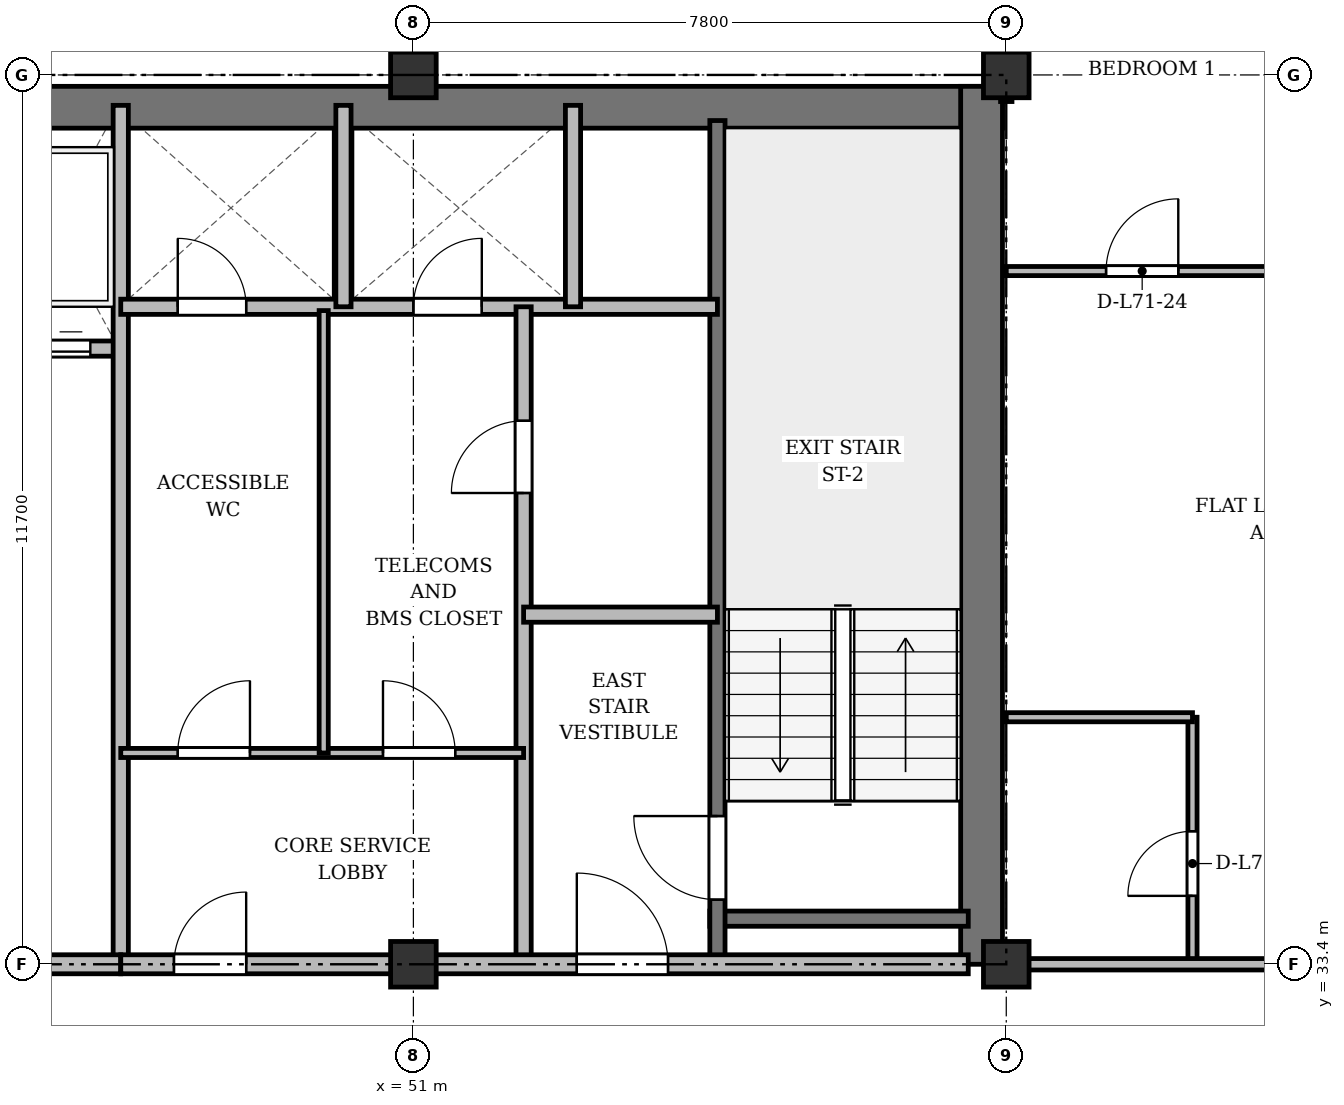
"""IFC4 building model, lengths in metres.
Left out: names, types, materials, properties, quantities, classifications, styles, units other than length and angle.
Written with IfcOpenShell. Run it as: python <this file> out.ifc"""

import sys

from ifc_helpers import new_model, si_unit, direction, frame, frame_2d, origin, origin_2d, place, context, subcontext, project, spatial, rectangle, extrude, source, transform, mapped, element, fill, save


model = new_model("IFC4")
c1 = context("Model", 3, precision=1e-05, world=origin(), true_north=direction((0.0, 1.0)))
c2 = subcontext(c1, "Body", "Model", "MODEL_VIEW")
j1 = project(units=[si_unit("LENGTHUNIT", "METRE"), si_unit("PLANEANGLEUNIT", "RADIAN")], contexts=[c1])
p1 = place(None, origin())
s1 = spatial("IfcSite", under=j1, at=p1, CompositionType="ELEMENT")
p2 = place(p1, origin())
s2 = spatial("IfcBuilding", under=s1, at=p2, CompositionType="ELEMENT")
p3 = place(p2, frame((0.0, 0.0, 273.9)))
s3 = spatial("IfcBuildingStorey", under=s2, at=p3, CompositionType="ELEMENT", Elevation=273.9)
m1 = source(origin(), c2, "Body", "SweptSolid", [
    extrude(rectangle(XDim=0.6, YDim=0.6, at=origin_2d()), origin(), (0.0, 0.0, 1.0), 3.6),
])
for number, where, z_axis, x_axis in (
    (1, (51.0, 33.4, 0.0), (0.0, 0.0, 1.0), (1.0, 0.0, 0.0)),
    (2, (51.0, 45.1, 0.0), (0.0, 0.0, 1.0), (1.0, 0.0, 0.0)),
    (3, (58.8, 33.4, 0.0), (0.0, 0.0, 1.0), (1.0, 0.0, 0.0)),
    (4, (58.8, 45.1, 0.0), (0.0, 0.0, 1.0), (1.0, 0.0, 0.0)),
):
    element("IfcColumn", number, at=place(p3, frame(where, z_axis=z_axis, x_axis=x_axis)), inside=s3, PredefinedType="COLUMN", context=c2, shape_type="MappedRepresentation", body=[
        mapped(m1, transform((0.0, 0.0, 0.0), x_axis=(1.0, 0.0, 0.0), y_axis=(0.0, 1.0, 0.0), z_axis=(0.0, 0.0, 1.0), scale=1.0)),
    ])
p4 = place(p3, frame((15.65, 44.675, 0.0), z_axis=(0.0, 0.0, 1.0), x_axis=(1.0, 0.0, 0.0)))
e5 = element("IfcWall", 5, at=p4, inside=s3, PredefinedType="SHEAR", context=c2, shape_type="SweptSolid", body=[
    extrude(rectangle(XDim=43.1, YDim=0.55, at=frame_2d((21.55, 0.0))), origin(), (0.0, 0.0, 1.0), 3.37),
])
p5 = place(p3, frame((58.475, 33.4, 0.0), z_axis=(0.0, 0.0, 1.0), x_axis=(0.0, 1.0, 0.0)))
e6 = element("IfcWall", 6, at=p5, inside=s3, PredefinedType="SHEAR", context=c2, shape_type="SweptSolid", body=[
    extrude(rectangle(XDim=11.55, YDim=0.55, at=frame_2d((5.775, 0.0))), origin(), (0.0, 0.0, 1.0), 3.37),
])
p6 = place(p3, frame((54.9, 34.0, 0.0), z_axis=(0.0, 0.0, 1.0), x_axis=(1.0, 0.0, 0.0)))
e7 = element("IfcWall", 7, at=p6, inside=s3, PredefinedType="SHEAR", context=c2, shape_type="SweptSolid", body=[
    extrude(rectangle(XDim=3.4, YDim=0.2, at=frame_2d((1.7, 0.0))), origin(), (0.0, 0.0, 1.0), 3.37),
])
p7 = place(p3, frame((55.0, 33.4, 0.0), z_axis=(0.0, 0.0, 1.0), x_axis=(0.0, 1.0, 0.0)))
e8 = element("IfcWall", 8, at=p7, inside=s3, PredefinedType="SHEAR", context=c2, shape_type="SweptSolid", body=[
    extrude(rectangle(XDim=11.1, YDim=0.2, at=frame_2d((5.55, 0.0))), origin(), (0.0, 0.0, 1.0), 3.37),
])
p8 = place(p7, frame((0.85, 0.0, 0.0)))
e9 = element("IfcOpeningElement", 9, at=p8, cuts=e8, PredefinedType="OPENING", context=c2, shape_type="SweptSolid", body=[
    extrude(rectangle(XDim=1.1, YDim=2.15, at=frame_2d((0.55, 1.075))), frame((0.0, 0.11, 0.0), z_axis=(0.0, -1.0, 0.0), x_axis=(1.0, 0.0, 0.0)), (0.0, 0.0, 1.0), 0.22),
])
p9 = place(p3, frame((40.25, 41.5, 0.0), z_axis=(0.0, 0.0, 1.0), x_axis=(1.0, 0.0, 0.0)))
e10 = element("IfcWall", 10, at=p9, inside=s3, PredefinedType="SOLIDWALL", context=c2, shape_type="SweptSolid", body=[
    extrude(rectangle(XDim=6.9, YDim=0.2, at=frame_2d((3.45, 0.0))), origin(), (0.0, 0.0, 1.0), 3.37),
])
p10 = place(p9, frame((0.35, 0.0, 0.0)))
e11 = element("IfcOpeningElement", 11, at=p10, cuts=e10, PredefinedType="OPENING", context=c2, shape_type="SweptSolid", body=[
    extrude(rectangle(XDim=1.05, YDim=2.15, at=frame_2d((0.525, 1.075))), frame((0.0, 0.11, 0.0), z_axis=(0.0, -1.0, 0.0), x_axis=(1.0, 0.0, 0.0)), (0.0, 0.0, 1.0), 0.22),
])
p11 = place(p9, frame((2.05, 0.0, 0.0)))
e12 = element("IfcOpeningElement", 12, at=p11, cuts=e10, PredefinedType="OPENING", context=c2, shape_type="SweptSolid", body=[
    extrude(rectangle(XDim=1.05, YDim=2.15, at=frame_2d((0.525, 1.075))), frame((0.0, 0.11, 0.0), z_axis=(0.0, -1.0, 0.0), x_axis=(1.0, 0.0, 0.0)), (0.0, 0.0, 1.0), 0.22),
])
p12 = place(p9, frame((3.75, 0.0, 0.0)))
e13 = element("IfcOpeningElement", 13, at=p12, cuts=e10, PredefinedType="OPENING", context=c2, shape_type="SweptSolid", body=[
    extrude(rectangle(XDim=1.05, YDim=2.15, at=frame_2d((0.525, 1.075))), frame((0.0, 0.11, 0.0), z_axis=(0.0, -1.0, 0.0), x_axis=(1.0, 0.0, 0.0)), (0.0, 0.0, 1.0), 0.22),
])
p13 = place(p9, frame((5.45, 0.0, 0.0)))
e14 = element("IfcOpeningElement", 14, at=p13, cuts=e10, PredefinedType="OPENING", context=c2, shape_type="SweptSolid", body=[
    extrude(rectangle(XDim=1.05, YDim=2.15, at=frame_2d((0.525, 1.075))), frame((0.0, 0.11, 0.0), z_axis=(0.0, -1.0, 0.0), x_axis=(1.0, 0.0, 0.0)), (0.0, 0.0, 1.0), 0.22),
])
p14 = place(p3, frame((47.15, 33.4, 0.0), z_axis=(0.0, 0.0, 1.0), x_axis=(0.0, 1.0, 0.0)))
e15 = element("IfcWall", 15, at=p14, inside=s3, PredefinedType="SOLIDWALL", context=c2, shape_type="SweptSolid", body=[
    extrude(rectangle(XDim=11.3, YDim=0.2, at=frame_2d((5.65, 0.0))), origin(), (0.0, 0.0, 1.0), 2.92),
])
p15 = place(p3, frame((40.1, 33.4, 0.0), z_axis=(0.0, 0.0, 1.0), x_axis=(1.0, 0.0, 0.0)))
e16 = element("IfcWall", 16, at=p15, inside=s3, PredefinedType="PARTITIONING", context=c2, shape_type="SweptSolid", body=[
    extrude(rectangle(XDim=7.05, YDim=0.25, at=frame_2d((3.525, 0.0))), origin(), (0.0, 0.0, 1.0), 2.92),
])
p16 = place(p15, frame((0.65, 0.0, 0.0)))
e17 = element("IfcOpeningElement", 17, at=p16, cuts=e16, PredefinedType="OPENING", context=c2, shape_type="SweptSolid", body=[
    extrude(rectangle(XDim=1.6, YDim=2.2, at=frame_2d((0.8, 1.1))), frame((0.0, 0.135, 0.0), z_axis=(0.0, -1.0, 0.0), x_axis=(1.0, 0.0, 0.0)), (0.0, 0.0, 1.0), 0.27),
])
p17 = place(p3, frame((47.15, 42.05, 0.0), z_axis=(0.0, 0.0, 1.0), x_axis=(1.0, 0.0, 0.0)))
e18 = element("IfcWall", 18, at=p17, inside=s3, PredefinedType="SOLIDWALL", context=c2, shape_type="SweptSolid", body=[
    extrude(rectangle(XDim=7.85, YDim=0.2, at=frame_2d((3.925, 0.0))), origin(), (0.0, 0.0, 1.0), 2.87),
])
p18 = place(p17, frame((0.75, 0.0, 0.0)))
e19 = element("IfcOpeningElement", 19, at=p18, cuts=e18, PredefinedType="OPENING", context=c2, shape_type="SweptSolid", body=[
    extrude(rectangle(XDim=0.9, YDim=2.1, at=frame_2d((0.45, 1.05))), frame((0.0, 0.11, 0.0), z_axis=(0.0, -1.0, 0.0), x_axis=(1.0, 0.0, 0.0)), (0.0, 0.0, 1.0), 0.22),
])
p19 = place(p17, frame((3.85, 0.0, 0.0)))
e20 = element("IfcOpeningElement", 20, at=p19, cuts=e18, PredefinedType="OPENING", context=c2, shape_type="SweptSolid", body=[
    extrude(rectangle(XDim=0.9, YDim=2.1, at=frame_2d((0.45, 1.05))), frame((0.0, 0.11, 0.0), z_axis=(0.0, -1.0, 0.0), x_axis=(1.0, 0.0, 0.0)), (0.0, 0.0, 1.0), 0.22),
])
for number, where, z_axis, x_axis in (
    (21, (50.08, 42.05, 0.0), (0.0, 0.0, 1.0), (0.0, 1.0, 0.0)),
    (22, (53.1, 42.05, 0.0), (0.0, 0.0, 1.0), (0.0, 1.0, 0.0)),
):
    element("IfcWall", number, at=place(p3, frame(where, z_axis=z_axis, x_axis=x_axis)), inside=s3, PredefinedType="SOLIDWALL", context=c2, shape_type="SweptSolid", body=[
        extrude(rectangle(XDim=2.65, YDim=0.2, at=frame_2d((1.325, 0.0))), origin(), (0.0, 0.0, 1.0), 3.37),
    ])
p20 = place(p3, frame((52.45, 33.4, 0.0), z_axis=(0.0, 0.0, 1.0), x_axis=(0.0, 1.0, 0.0)))
e23 = element("IfcWall", 23, at=p20, inside=s3, PredefinedType="PARTITIONING", context=c2, shape_type="SweptSolid", body=[
    extrude(rectangle(XDim=8.65, YDim=0.2, at=frame_2d((4.325, 0.0))), origin(), (0.0, 0.0, 1.0), 2.92),
])
p21 = place(p20, frame((6.2, 0.0, 0.0)))
e24 = element("IfcOpeningElement", 24, at=p21, cuts=e23, PredefinedType="OPENING", context=c2, shape_type="SweptSolid", body=[
    extrude(rectangle(XDim=0.95, YDim=2.15, at=frame_2d((0.475, 1.075))), frame((0.0, 0.11, 0.0), z_axis=(0.0, -1.0, 0.0), x_axis=(1.0, 0.0, 0.0)), (0.0, 0.0, 1.0), 0.22),
])
p22 = place(p3, frame((52.45, 38.0, 0.0), z_axis=(0.0, 0.0, 1.0), x_axis=(1.0, 0.0, 0.0)))
e25 = element("IfcWall", 25, at=p22, inside=s3, PredefinedType="PARTITIONING", context=c2, shape_type="SweptSolid", body=[
    extrude(rectangle(XDim=2.55, YDim=0.2, at=frame_2d((1.275, 0.0))), origin(), (0.0, 0.0, 1.0), 3.37),
])
p23 = place(p3, frame((47.15, 36.18, 0.0), z_axis=(0.0, 0.0, 1.0), x_axis=(1.0, 0.0, 0.0)))
e26 = element("IfcWall", 26, at=p23, inside=s3, PredefinedType="PARTITIONING", context=c2, shape_type="SweptSolid", body=[
    extrude(rectangle(XDim=5.3, YDim=0.12, at=frame_2d((2.65, 0.0))), origin(), (0.0, 0.0, 1.0), 2.87),
])
p24 = place(p23, frame((0.75, 0.0, 0.0)))
e27 = element("IfcOpeningElement", 27, at=p24, cuts=e26, PredefinedType="OPENING", context=c2, shape_type="SweptSolid", body=[
    extrude(rectangle(XDim=0.95, YDim=2.15, at=frame_2d((0.475, 1.075))), frame((0.0, 0.07, 0.0), z_axis=(0.0, -1.0, 0.0), x_axis=(1.0, 0.0, 0.0)), (0.0, 0.0, 1.0), 0.14),
])
p25 = place(p23, frame((3.45, 0.0, 0.0)))
e28 = element("IfcOpeningElement", 28, at=p25, cuts=e26, PredefinedType="OPENING", context=c2, shape_type="SweptSolid", body=[
    extrude(rectangle(XDim=0.95, YDim=2.15, at=frame_2d((0.475, 1.075))), frame((0.0, 0.07, 0.0), z_axis=(0.0, -1.0, 0.0), x_axis=(1.0, 0.0, 0.0)), (0.0, 0.0, 1.0), 0.14),
])
p26 = place(p3, frame((49.82, 36.18, 0.0), z_axis=(0.0, 0.0, 1.0), x_axis=(0.0, 1.0, 0.0)))
e29 = element("IfcWall", 29, at=p26, inside=s3, PredefinedType="PARTITIONING", context=c2, shape_type="SweptSolid", body=[
    extrude(rectangle(XDim=5.82, YDim=0.12, at=frame_2d((2.91, 0.0))), origin(), (0.0, 0.0, 1.0), 3.37),
])
p27 = place(p3, frame((47.15, 33.4, 0.0), z_axis=(0.0, 0.0, 1.0), x_axis=(1.0, 0.0, 0.0)))
e30 = element("IfcWall", 30, at=p27, inside=s3, PredefinedType="PARTITIONING", context=c2, shape_type="SweptSolid", body=[
    extrude(rectangle(XDim=11.15, YDim=0.25, at=frame_2d((5.575, 0.0))), origin(), (0.0, 0.0, 1.0), 2.92),
])
p28 = place(p27, frame((0.7, 0.0, 0.0)))
e31 = element("IfcOpeningElement", 31, at=p28, cuts=e30, PredefinedType="OPENING", context=c2, shape_type="SweptSolid", body=[
    extrude(rectangle(XDim=0.95, YDim=2.15, at=frame_2d((0.475, 1.075))), frame((0.0, 0.135, 0.0), z_axis=(0.0, -1.0, 0.0), x_axis=(1.0, 0.0, 0.0)), (0.0, 0.0, 1.0), 0.27),
])
p29 = place(p27, frame((6.0, 0.0, 0.0)))
e32 = element("IfcOpeningElement", 32, at=p29, cuts=e30, PredefinedType="OPENING", context=c2, shape_type="SweptSolid", body=[
    extrude(rectangle(XDim=1.2, YDim=2.15, at=frame_2d((0.6, 1.075))), frame((0.0, 0.135, 0.0), z_axis=(0.0, -1.0, 0.0), x_axis=(1.0, 0.0, 0.0)), (0.0, 0.0, 1.0), 0.27),
])
p30 = place(p3, frame((61.25, 33.4, 0.0), z_axis=(0.0, 0.0, 1.0), x_axis=(0.0, 1.0, 0.0)))
e33 = element("IfcWall", 33, at=p30, inside=s3, PredefinedType="PARTITIONING", context=c2, shape_type="SweptSolid", body=[
    extrude(rectangle(XDim=3.25, YDim=0.12, at=frame_2d((1.625, 0.0))), origin(), (0.0, 0.0, 1.0), 2.92),
])
p31 = place(p30, frame((0.9, 0.0, 0.0)))
e34 = element("IfcOpeningElement", 34, at=p31, cuts=e33, PredefinedType="OPENING", context=c2, shape_type="SweptSolid", body=[
    extrude(rectangle(XDim=0.85, YDim=2.1, at=frame_2d((0.425, 1.05))), frame((0.0, 0.07, 0.0), z_axis=(0.0, -1.0, 0.0), x_axis=(1.0, 0.0, 0.0)), (0.0, 0.0, 1.0), 0.14),
])
p32 = place(p3, frame((58.8, 36.65, 0.0), z_axis=(0.0, 0.0, 1.0), x_axis=(1.0, 0.0, 0.0)))
e35 = element("IfcWall", 35, at=p32, inside=s3, PredefinedType="PARTITIONING", context=c2, shape_type="SweptSolid", body=[
    extrude(rectangle(XDim=2.45, YDim=0.12, at=frame_2d((1.225, 0.0))), origin(), (0.0, 0.0, 1.0), 2.87),
])
p33 = place(p3, frame((58.8, 42.52, 0.0), z_axis=(0.0, 0.0, 1.0), x_axis=(1.0, 0.0, 0.0)))
e36 = element("IfcWall", 36, at=p33, inside=s3, PredefinedType="PARTITIONING", context=c2, shape_type="SweptSolid", body=[
    extrude(rectangle(XDim=3.575, YDim=0.12, at=frame_2d((1.788, 0.0))), origin(), (0.0, 0.0, 1.0), 2.87),
])
p34 = place(p33, frame((1.313, 0.0, 0.0)))
e37 = element("IfcOpeningElement", 37, at=p34, cuts=e36, PredefinedType="OPENING", context=c2, shape_type="SweptSolid", body=[
    extrude(rectangle(XDim=0.95, YDim=2.15, at=frame_2d((0.475, 1.075))), frame((0.0, 0.07, 0.0), z_axis=(0.0, -1.0, 0.0), x_axis=(1.0, 0.0, 0.0)), (0.0, 0.0, 1.0), 0.14),
])
p35 = place(p3, frame((58.8, 33.4, 0.0), z_axis=(0.0, 0.0, 1.0), x_axis=(1.0, 0.0, 0.0)))
e38 = element("IfcWall", 38, at=p35, inside=s3, PredefinedType="PARTITIONING", context=c2, shape_type="SweptSolid", body=[
    extrude(rectangle(XDim=7.15, YDim=0.15, at=frame_2d((3.575, 0.0))), origin(), (0.0, 0.0, 1.0), 2.92),
])
p36 = place(p35, frame((4.08, 0.0, 0.0)))
e39 = element("IfcOpeningElement", 39, at=p36, cuts=e38, PredefinedType="OPENING", context=c2, shape_type="SweptSolid", body=[
    extrude(rectangle(XDim=0.95, YDim=2.15, at=frame_2d((0.475, 1.075))), frame((0.0, 0.085, 0.0), z_axis=(0.0, -1.0, 0.0), x_axis=(1.0, 0.0, 0.0)), (0.0, 0.0, 1.0), 0.17),
])
p37 = place(p3, frame((58.8, 44.75, 0.0), z_axis=(0.0, 0.0, 1.0), x_axis=(0.0, 1.0, 0.0)))
e40 = element("IfcWall", 40, at=p37, inside=s3, PredefinedType="PARTITIONING", context=c2, shape_type="SweptSolid", body=[
    extrude(rectangle(XDim=3.61, YDim=0.15, at=frame_2d((1.805, 0.0))), origin(), (0.0, 0.0, 1.0), 2.87),
])
p38 = place(p37, frame((1.1, 0.0, 0.0)))
e41 = element("IfcOpeningElement", 41, at=p38, cuts=e40, PredefinedType="OPENING", context=c2, shape_type="SweptSolid", body=[
    extrude(rectangle(XDim=0.95, YDim=2.15, at=frame_2d((0.475, 1.075))), frame((0.0, 0.085, 0.0), z_axis=(0.0, -1.0, 0.0), x_axis=(1.0, 0.0, 0.0)), (0.0, 0.0, 1.0), 0.17),
])
m2 = source(origin(), c2, "Body", "SweptSolid", [
    extrude(rectangle(XDim=1.1, YDim=2.15, at=frame_2d((0.55, 1.075))), frame((0.0, 0.025, 0.0), z_axis=(0.0, -1.0, 0.0), x_axis=(1.0, 0.0, 0.0)), (0.0, 0.0, 1.0), 0.05),
])
p39 = place(p8, origin())
e42 = element("IfcDoor", 42, at=p39, inside=s3, OperationType="SINGLE_SWING_RIGHT", PredefinedType="DOOR", context=c2, shape_type="MappedRepresentation", body=[
    mapped(m2, transform((0.0, 0.0, 0.0), x_axis=(1.0, 0.0, 0.0), y_axis=(0.0, 1.0, 0.0), z_axis=(0.0, 0.0, 1.0), scale=1.0)),
])
fill(e9, e42)
m3 = source(origin(), c2, "Body", "SweptSolid", [
    extrude(rectangle(XDim=1.05, YDim=2.15, at=frame_2d((0.525, 1.075))), frame((0.0, 0.025, 0.0), z_axis=(0.0, -1.0, 0.0), x_axis=(1.0, 0.0, 0.0)), (0.0, 0.0, 1.0), 0.05),
])
p40 = place(p13, origin())
e43 = element("IfcDoor", 43, at=p40, inside=s3, OperationType="DOUBLE_DOOR_SLIDING", PredefinedType="DOOR", context=c2, shape_type="MappedRepresentation", body=[
    mapped(m3, transform((0.0, 0.0, 0.0), x_axis=(1.0, 0.0, 0.0), y_axis=(0.0, 1.0, 0.0), z_axis=(0.0, 0.0, 1.0), scale=1.0)),
])
fill(e14, e43)
m4 = source(origin(), c2, "Body", "SweptSolid", [
    extrude(rectangle(XDim=0.9, YDim=2.1, at=frame_2d((0.45, 1.05))), frame((0.0, 0.025, 0.0), z_axis=(0.0, -1.0, 0.0), x_axis=(1.0, 0.0, 0.0)), (0.0, 0.0, 1.0), 0.05),
])
p41 = place(p18, origin())
e44 = element("IfcDoor", 44, at=p41, inside=s3, OperationType="SINGLE_SWING_LEFT", PredefinedType="DOOR", context=c2, shape_type="MappedRepresentation", body=[
    mapped(m4, transform((0.0, 0.0, 0.0), x_axis=(1.0, 0.0, 0.0), y_axis=(0.0, 1.0, 0.0), z_axis=(0.0, 0.0, 1.0), scale=1.0)),
])
fill(e19, e44)
p42 = place(p19, origin())
e45 = element("IfcDoor", 45, at=p42, inside=s3, OperationType="SINGLE_SWING_RIGHT", PredefinedType="DOOR", context=c2, shape_type="MappedRepresentation", body=[
    mapped(m4, transform((0.0, 0.0, 0.0), x_axis=(1.0, 0.0, 0.0), y_axis=(0.0, 1.0, 0.0), z_axis=(0.0, 0.0, 1.0), scale=1.0)),
])
fill(e20, e45)
m5 = source(origin(), c2, "Body", "SweptSolid", [
    extrude(rectangle(XDim=0.95, YDim=2.15, at=frame_2d((0.475, 1.075))), frame((0.0, 0.025, 0.0), z_axis=(0.0, -1.0, 0.0), x_axis=(1.0, 0.0, 0.0)), (0.0, 0.0, 1.0), 0.05),
])
p43 = place(p21, origin())
e46 = element("IfcDoor", 46, at=p43, inside=s3, OperationType="SINGLE_SWING_LEFT", PredefinedType="DOOR", context=c2, shape_type="MappedRepresentation", body=[
    mapped(m5, transform((0.0, 0.0, 0.0), x_axis=(1.0, 0.0, 0.0), y_axis=(0.0, 1.0, 0.0), z_axis=(0.0, 0.0, 1.0), scale=1.0)),
])
fill(e24, e46)
p44 = place(p24, origin())
e47 = element("IfcDoor", 47, at=p44, inside=s3, OperationType="SINGLE_SWING_RIGHT", PredefinedType="DOOR", context=c2, shape_type="MappedRepresentation", body=[
    mapped(m5, transform((0.0, 0.0, 0.0), x_axis=(1.0, 0.0, 0.0), y_axis=(0.0, 1.0, 0.0), z_axis=(0.0, 0.0, 1.0), scale=1.0)),
])
fill(e27, e47)
p45 = place(p25, origin())
e48 = element("IfcDoor", 48, at=p45, inside=s3, OperationType="SINGLE_SWING_LEFT", PredefinedType="DOOR", context=c2, shape_type="MappedRepresentation", body=[
    mapped(m5, transform((0.0, 0.0, 0.0), x_axis=(1.0, 0.0, 0.0), y_axis=(0.0, 1.0, 0.0), z_axis=(0.0, 0.0, 1.0), scale=1.0)),
])
fill(e28, e48)
p46 = place(p28, origin())
e49 = element("IfcDoor", 49, at=p46, inside=s3, OperationType="SINGLE_SWING_RIGHT", PredefinedType="DOOR", context=c2, shape_type="MappedRepresentation", body=[
    mapped(m5, transform((0.0, 0.0, 0.0), x_axis=(1.0, 0.0, 0.0), y_axis=(0.0, 1.0, 0.0), z_axis=(0.0, 0.0, 1.0), scale=1.0)),
])
fill(e31, e49)
m6 = source(origin(), c2, "Body", "SweptSolid", [
    extrude(rectangle(XDim=1.2, YDim=2.15, at=frame_2d((0.6, 1.075))), frame((0.0, 0.025, 0.0), z_axis=(0.0, -1.0, 0.0), x_axis=(1.0, 0.0, 0.0)), (0.0, 0.0, 1.0), 0.05),
])
p47 = place(p29, origin())
e50 = element("IfcDoor", 50, at=p47, inside=s3, OperationType="SINGLE_SWING_LEFT", PredefinedType="DOOR", context=c2, shape_type="MappedRepresentation", body=[
    mapped(m6, transform((0.0, 0.0, 0.0), x_axis=(1.0, 0.0, 0.0), y_axis=(0.0, 1.0, 0.0), z_axis=(0.0, 0.0, 1.0), scale=1.0)),
])
fill(e32, e50)
m7 = source(origin(), c2, "Body", "SweptSolid", [
    extrude(rectangle(XDim=0.85, YDim=2.1, at=frame_2d((0.425, 1.05))), frame((0.0, 0.025, 0.0), z_axis=(0.0, -1.0, 0.0), x_axis=(1.0, 0.0, 0.0)), (0.0, 0.0, 1.0), 0.05),
])
p48 = place(p31, origin())
e51 = element("IfcDoor", 51, at=p48, inside=s3, OperationType="SINGLE_SWING_LEFT", PredefinedType="DOOR", context=c2, shape_type="MappedRepresentation", body=[
    mapped(m7, transform((0.0, 0.0, 0.0), x_axis=(1.0, 0.0, 0.0), y_axis=(0.0, 1.0, 0.0), z_axis=(0.0, 0.0, 1.0), scale=1.0)),
])
fill(e34, e51)
p49 = place(p34, origin())
e52 = element("IfcDoor", 52, at=p49, inside=s3, OperationType="SINGLE_SWING_RIGHT", PredefinedType="DOOR", context=c2, shape_type="MappedRepresentation", body=[
    mapped(m5, transform((0.0, 0.0, 0.0), x_axis=(1.0, 0.0, 0.0), y_axis=(0.0, 1.0, 0.0), z_axis=(0.0, 0.0, 1.0), scale=1.0)),
])
fill(e37, e52)
save(model, sys.argv[1])
